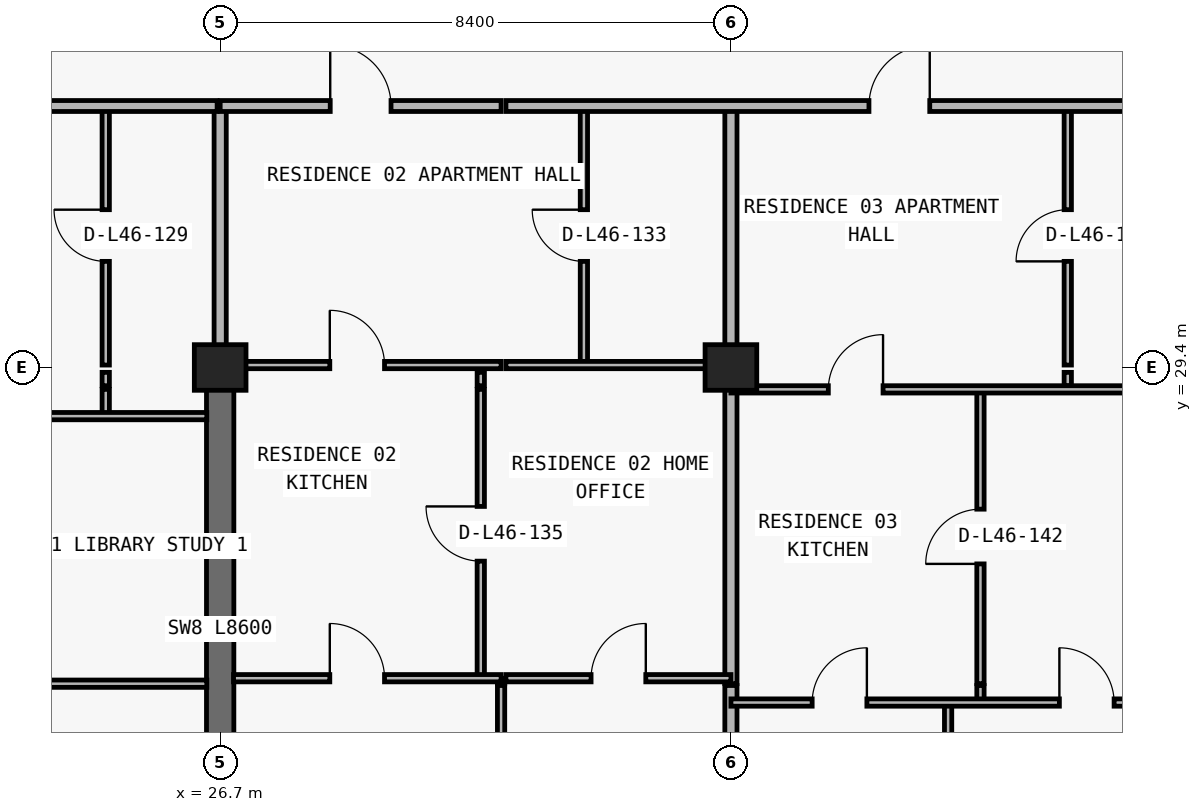
"""IFC4 building model, lengths in metres.
Left out: names, types, materials, properties, quantities, classifications, styles, units other than length and angle.
Written with IfcOpenShell. Run it as: python <this file> out.ifc"""

import sys

from ifc_helpers import new_model, si_unit, direction, frame, frame_2d, origin, origin_2d, place, context, subcontext, project, spatial, rectangle, extrude, element, fill, save


model = new_model("IFC4")
c1 = context("Model", 3, precision=1e-05, world=origin(), true_north=direction((0.0, 1.0)))
c2 = subcontext(c1, "Body", "Model", "MODEL_VIEW")
j1 = project(units=[si_unit("LENGTHUNIT", "METRE"), si_unit("PLANEANGLEUNIT", "RADIAN")], contexts=[c1])
p1 = place(None, origin())
s1 = spatial("IfcSite", under=j1, at=p1, CompositionType="ELEMENT")
p2 = place(p1, origin())
s2 = spatial("IfcBuilding", under=s1, at=p2, CompositionType="ELEMENT")
p3 = place(p2, frame((0.0, 0.0, 167.1)))
s3 = spatial("IfcBuildingStorey", under=s2, at=p3, CompositionType="ELEMENT", Elevation=167.1)
for number, where, z_axis, x_axis in (
    (1, (26.7, 29.4, 0.0), (0.0, 0.0, 1.0), (1.0, 0.0, 0.0)),
    (2, (35.1, 29.4, 0.0), (0.0, 0.0, 1.0), (1.0, 0.0, 0.0)),
):
    element("IfcColumn", number, at=place(p3, frame(where, z_axis=z_axis, x_axis=x_axis)), inside=s3, PredefinedType="COLUMN", context=c2, shape_type="SweptSolid", body=[
        extrude(rectangle(XDim=0.85, YDim=0.75, at=origin_2d()), origin(), (0.0, 0.0, 1.0), 3.05),
    ])
p4 = place(p3, frame((26.7, 20.8, 0.0), z_axis=(0.0, 0.0, 1.0), x_axis=(0.0, 1.0, 0.0)))
e3 = element("IfcWall", 3, at=p4, inside=s3, PredefinedType="SHEAR", context=c2, shape_type="SweptSolid", body=[
    extrude(rectangle(XDim=8.6, YDim=0.45, at=frame_2d((4.3, 0.0))), origin(), (0.0, 0.0, 1.0), 3.05),
])
p5 = place(p3, frame((24.818, 28.6, 0.0), z_axis=(0.0, 0.0, 1.0), x_axis=(0.0, 1.0, 0.0)))
e4 = element("IfcWall", 4, at=p5, inside=s3, PredefinedType="PARTITIONING", context=c2, shape_type="SweptSolid", body=[
    extrude(rectangle(XDim=0.44, YDim=0.12, at=frame_2d((0.22, 0.0))), origin(), (0.0, 0.0, 1.0), 3.05),
])
p6 = place(p3, frame((24.818, 29.1, 0.0), z_axis=(0.0, 0.0, 1.0), x_axis=(0.0, 1.0, 0.0)))
e5 = element("IfcWall", 5, at=p6, inside=s3, PredefinedType="PARTITIONING", context=c2, shape_type="SweptSolid", body=[
    extrude(rectangle(XDim=0.22, YDim=0.12, at=frame_2d((0.11, 0.0))), origin(), (0.0, 0.0, 1.0), 3.05),
])
p7 = place(p3, frame((24.818, 29.44, 0.0), z_axis=(0.0, 0.0, 1.0), x_axis=(0.0, 1.0, 0.0)))
e6 = element("IfcWall", 6, at=p7, inside=s3, PredefinedType="PARTITIONING", context=c2, shape_type="SweptSolid", body=[
    extrude(rectangle(XDim=4.26, YDim=0.12, at=frame_2d((2.13, 0.0))), origin(), (0.0, 0.0, 1.0), 3.05),
])
p8 = place(p7, frame((1.705, 0.0, 0.0)))
e7 = element("IfcOpeningElement", 7, at=p8, cuts=e6, PredefinedType="OPENING", context=c2, shape_type="SweptSolid", body=[
    extrude(rectangle(XDim=0.85, YDim=2.1, at=frame_2d((0.425, 1.05))), frame((0.0, 0.07, 0.0), z_axis=(0.0, -1.0, 0.0), x_axis=(1.0, 0.0, 0.0)), (0.0, 0.0, 1.0), 0.14),
])
p9 = place(p3, frame((26.7, 29.44, 0.0), z_axis=(0.0, 0.0, 1.0), x_axis=(0.0, 1.0, 0.0)))
e8 = element("IfcWall", 8, at=p9, inside=s3, PredefinedType="PARTITIONING", context=c2, shape_type="SweptSolid", body=[
    extrude(rectangle(XDim=4.26, YDim=0.2, at=frame_2d((2.13, 0.0))), origin(), (0.0, 0.0, 1.0), 2.335),
])
p10 = place(p3, frame((30.986, 24.29, 0.0), z_axis=(0.0, 0.0, 1.0), x_axis=(0.0, 1.0, 0.0)))
e9 = element("IfcWall", 9, at=p10, inside=s3, PredefinedType="PARTITIONING", context=c2, shape_type="SweptSolid", body=[
    extrude(rectangle(XDim=4.75, YDim=0.12, at=frame_2d((2.375, 0.0))), origin(), (0.0, 0.0, 1.0), 3.05),
])
p11 = place(p10, frame((1.925, 0.0, 0.0)))
e10 = element("IfcOpeningElement", 10, at=p11, cuts=e9, PredefinedType="OPENING", context=c2, shape_type="SweptSolid", body=[
    extrude(rectangle(XDim=0.9, YDim=2.15, at=frame_2d((0.45, 1.075))), frame((0.0, 0.07, 0.0), z_axis=(0.0, -1.0, 0.0), x_axis=(1.0, 0.0, 0.0)), (0.0, 0.0, 1.0), 0.14),
])
p12 = place(p3, frame((30.986, 29.1, 0.0), z_axis=(0.0, 0.0, 1.0), x_axis=(0.0, 1.0, 0.0)))
e11 = element("IfcWall", 11, at=p12, inside=s3, PredefinedType="PARTITIONING", context=c2, shape_type="SweptSolid", body=[
    extrude(rectangle(XDim=0.22, YDim=0.12, at=frame_2d((0.11, 0.0))), origin(), (0.0, 0.0, 1.0), 3.05),
])
p13 = place(p3, frame((31.32, 11.24, 0.0), z_axis=(0.0, 0.0, 1.0), x_axis=(0.0, 1.0, 0.0)))
e12 = element("IfcWall", 12, at=p13, inside=s3, PredefinedType="PARTITIONING", context=c2, shape_type="SweptSolid", body=[
    extrude(rectangle(XDim=12.93, YDim=0.12, at=frame_2d((6.465, 0.0))), origin(), (0.0, 0.0, 1.0), 3.05),
])
p14 = place(p3, frame((31.32, 24.2, 0.0), z_axis=(0.0, 0.0, 1.0), x_axis=(0.0, 1.0, 0.0)))
e13 = element("IfcWall", 13, at=p14, inside=s3, PredefinedType="PARTITIONING", context=c2, shape_type="SweptSolid", body=[
    extrude(rectangle(XDim=0.09, YDim=0.12, at=frame_2d((0.045, 0.0))), origin(), (0.0, 0.0, 1.0), 3.05),
])
p15 = place(p3, frame((32.682, 29.44, 0.0), z_axis=(0.0, 0.0, 1.0), x_axis=(0.0, 1.0, 0.0)))
e14 = element("IfcWall", 14, at=p15, inside=s3, PredefinedType="PARTITIONING", context=c2, shape_type="SweptSolid", body=[
    extrude(rectangle(XDim=4.26, YDim=0.12, at=frame_2d((2.13, 0.0))), origin(), (0.0, 0.0, 1.0), 3.05),
])
p16 = place(p15, frame((1.705, 0.0, 0.0)))
e15 = element("IfcOpeningElement", 15, at=p16, cuts=e14, PredefinedType="OPENING", context=c2, shape_type="SweptSolid", body=[
    extrude(rectangle(XDim=0.85, YDim=2.1, at=frame_2d((0.425, 1.05))), frame((0.0, 0.07, 0.0), z_axis=(0.0, -1.0, 0.0), x_axis=(1.0, 0.0, 0.0)), (0.0, 0.0, 1.0), 0.14),
])
p17 = place(p3, frame((35.1, 11.24, 0.0), z_axis=(0.0, 0.0, 1.0), x_axis=(0.0, 1.0, 0.0)))
e16 = element("IfcWall", 16, at=p17, inside=s3, PredefinedType="PARTITIONING", context=c2, shape_type="SweptSolid", body=[
    extrude(rectangle(XDim=12.93, YDim=0.2, at=frame_2d((6.465, 0.0))), origin(), (0.0, 0.0, 1.0), 2.263),
])
p18 = place(p3, frame((35.1, 24.2, 0.0), z_axis=(0.0, 0.0, 1.0), x_axis=(0.0, 1.0, 0.0)))
e17 = element("IfcWall", 17, at=p18, inside=s3, PredefinedType="PARTITIONING", context=c2, shape_type="SweptSolid", body=[
    extrude(rectangle(XDim=4.84, YDim=0.2, at=frame_2d((2.42, 0.0))), origin(), (0.0, 0.0, 1.0), 2.263),
])
p19 = place(p3, frame((35.1, 29.1, 0.0), z_axis=(0.0, 0.0, 1.0), x_axis=(0.0, 1.0, 0.0)))
e18 = element("IfcWall", 18, at=p19, inside=s3, PredefinedType="PARTITIONING", context=c2, shape_type="SweptSolid", body=[
    extrude(rectangle(XDim=0.22, YDim=0.2, at=frame_2d((0.11, 0.0))), origin(), (0.0, 0.0, 1.0), 3.05),
])
p20 = place(p3, frame((35.1, 29.44, 0.0), z_axis=(0.0, 0.0, 1.0), x_axis=(0.0, 1.0, 0.0)))
e19 = element("IfcWall", 19, at=p20, inside=s3, PredefinedType="PARTITIONING", context=c2, shape_type="SweptSolid", body=[
    extrude(rectangle(XDim=4.26, YDim=0.2, at=frame_2d((2.13, 0.0))), origin(), (0.0, 0.0, 1.0), 2.263),
])
p21 = place(p3, frame((38.672, 11.24, 0.0), z_axis=(0.0, 0.0, 1.0), x_axis=(0.0, 1.0, 0.0)))
e20 = element("IfcWall", 20, at=p21, inside=s3, PredefinedType="PARTITIONING", context=c2, shape_type="SweptSolid", body=[
    extrude(rectangle(XDim=12.65, YDim=0.12, at=frame_2d((6.325, 0.0))), origin(), (0.0, 0.0, 1.0), 3.05),
])
p22 = place(p3, frame((39.204, 23.89, 0.0), z_axis=(0.0, 0.0, 1.0), x_axis=(0.0, 1.0, 0.0)))
e21 = element("IfcWall", 21, at=p22, inside=s3, PredefinedType="PARTITIONING", context=c2, shape_type="SweptSolid", body=[
    extrude(rectangle(XDim=0.28, YDim=0.12, at=frame_2d((0.14, 0.0))), origin(), (0.0, 0.0, 1.0), 3.05),
])
p23 = place(p3, frame((39.204, 24.2, 0.0), z_axis=(0.0, 0.0, 1.0), x_axis=(0.0, 1.0, 0.0)))
e22 = element("IfcWall", 22, at=p23, inside=s3, PredefinedType="PARTITIONING", context=c2, shape_type="SweptSolid", body=[
    extrude(rectangle(XDim=4.84, YDim=0.12, at=frame_2d((2.42, 0.0))), origin(), (0.0, 0.0, 1.0), 3.05),
])
p24 = place(p23, frame((1.97, 0.0, 0.0)))
e23 = element("IfcOpeningElement", 23, at=p24, cuts=e22, PredefinedType="OPENING", context=c2, shape_type="SweptSolid", body=[
    extrude(rectangle(XDim=0.9, YDim=2.15, at=frame_2d((0.45, 1.075))), frame((0.0, 0.07, 0.0), z_axis=(0.0, -1.0, 0.0), x_axis=(1.0, 0.0, 0.0)), (0.0, 0.0, 1.0), 0.14),
])
p25 = place(p3, frame((40.64, 29.1, 0.0), z_axis=(0.0, 0.0, 1.0), x_axis=(0.0, 1.0, 0.0)))
e24 = element("IfcWall", 24, at=p25, inside=s3, PredefinedType="PARTITIONING", context=c2, shape_type="SweptSolid", body=[
    extrude(rectangle(XDim=0.22, YDim=0.12, at=frame_2d((0.11, 0.0))), origin(), (0.0, 0.0, 1.0), 2.725),
])
p26 = place(p3, frame((40.64, 29.44, 0.0), z_axis=(0.0, 0.0, 1.0), x_axis=(0.0, 1.0, 0.0)))
e25 = element("IfcWall", 25, at=p26, inside=s3, PredefinedType="PARTITIONING", context=c2, shape_type="SweptSolid", body=[
    extrude(rectangle(XDim=4.26, YDim=0.12, at=frame_2d((2.13, 0.0))), origin(), (0.0, 0.0, 1.0), 3.05),
])
p27 = place(p26, frame((1.705, 0.0, 0.0)))
e26 = element("IfcOpeningElement", 26, at=p27, cuts=e25, PredefinedType="OPENING", context=c2, shape_type="SweptSolid", body=[
    extrude(rectangle(XDim=0.85, YDim=2.1, at=frame_2d((0.425, 1.05))), frame((0.0, 0.07, 0.0), z_axis=(0.0, -1.0, 0.0), x_axis=(1.0, 0.0, 0.0)), (0.0, 0.0, 1.0), 0.14),
])
p28 = place(p3, frame((35.1, 23.89, 0.0), z_axis=(0.0, 0.0, 1.0), x_axis=(1.0, 0.0, 0.0)))
e27 = element("IfcWall", 27, at=p28, inside=s3, PredefinedType="PARTITIONING", context=c2, shape_type="SweptSolid", body=[
    extrude(rectangle(XDim=7.6, YDim=0.12, at=frame_2d((3.8, 0.0))), origin(), (0.0, 0.0, 1.0), 3.05),
])
p29 = place(p28, frame((1.336, 0.0, 0.0)))
e28 = element("IfcOpeningElement", 28, at=p29, cuts=e27, PredefinedType="OPENING", context=c2, shape_type="SweptSolid", body=[
    extrude(rectangle(XDim=0.9, YDim=2.15, at=frame_2d((0.45, 1.075))), frame((0.0, 0.07, 0.0), z_axis=(0.0, -1.0, 0.0), x_axis=(1.0, 0.0, 0.0)), (0.0, 0.0, 1.0), 0.14),
])
p30 = place(p28, frame((5.402, 0.0, 0.0)))
e29 = element("IfcOpeningElement", 29, at=p30, cuts=e27, PredefinedType="OPENING", context=c2, shape_type="SweptSolid", body=[
    extrude(rectangle(XDim=0.9, YDim=2.15, at=frame_2d((0.45, 1.075))), frame((0.0, 0.07, 0.0), z_axis=(0.0, -1.0, 0.0), x_axis=(1.0, 0.0, 0.0)), (0.0, 0.0, 1.0), 0.14),
])
p31 = place(p3, frame((18.3, 24.2, 0.0), z_axis=(0.0, 0.0, 1.0), x_axis=(1.0, 0.0, 0.0)))
e30 = element("IfcWall", 30, at=p31, inside=s3, PredefinedType="PARTITIONING", context=c2, shape_type="SweptSolid", body=[
    extrude(rectangle(XDim=8.18, YDim=0.12, at=frame_2d((4.09, 0.0))), origin(), (0.0, 0.0, 1.0), 3.05),
])
p32 = place(p31, frame((3.64, 0.0, 0.0)))
e31 = element("IfcOpeningElement", 31, at=p32, cuts=e30, PredefinedType="OPENING", context=c2, shape_type="SweptSolid", body=[
    extrude(rectangle(XDim=0.9, YDim=2.15, at=frame_2d((0.45, 1.075))), frame((0.0, 0.07, 0.0), z_axis=(0.0, -1.0, 0.0), x_axis=(1.0, 0.0, 0.0)), (0.0, 0.0, 1.0), 0.14),
])
p33 = place(p3, frame((26.92, 24.29, 0.0), z_axis=(0.0, 0.0, 1.0), x_axis=(1.0, 0.0, 0.0)))
e32 = element("IfcWall", 32, at=p33, inside=s3, PredefinedType="PARTITIONING", context=c2, shape_type="SweptSolid", body=[
    extrude(rectangle(XDim=4.4, YDim=0.12, at=frame_2d((2.2, 0.0))), origin(), (0.0, 0.0, 1.0), 3.05),
])
p34 = place(p33, frame((1.583, 0.0, 0.0)))
e33 = element("IfcOpeningElement", 33, at=p34, cuts=e32, PredefinedType="OPENING", context=c2, shape_type="SweptSolid", body=[
    extrude(rectangle(XDim=0.9, YDim=2.15, at=frame_2d((0.45, 1.075))), frame((0.0, 0.07, 0.0), z_axis=(0.0, -1.0, 0.0), x_axis=(1.0, 0.0, 0.0)), (0.0, 0.0, 1.0), 0.14),
])
p35 = place(p3, frame((31.4, 24.29, 0.0), z_axis=(0.0, 0.0, 1.0), x_axis=(1.0, 0.0, 0.0)))
e34 = element("IfcWall", 34, at=p35, inside=s3, PredefinedType="PARTITIONING", context=c2, shape_type="SweptSolid", body=[
    extrude(rectangle(XDim=3.7, YDim=0.12, at=frame_2d((1.85, 0.0))), origin(), (0.0, 0.0, 1.0), 3.05),
])
p36 = place(p35, frame((1.4, 0.0, 0.0)))
e35 = element("IfcOpeningElement", 35, at=p36, cuts=e34, PredefinedType="OPENING", context=c2, shape_type="SweptSolid", body=[
    extrude(rectangle(XDim=0.9, YDim=2.15, at=frame_2d((0.45, 1.075))), frame((0.0, 0.07, 0.0), z_axis=(0.0, -1.0, 0.0), x_axis=(1.0, 0.0, 0.0)), (0.0, 0.0, 1.0), 0.14),
])
p37 = place(p3, frame((18.3, 28.6, 0.0), z_axis=(0.0, 0.0, 1.0), x_axis=(1.0, 0.0, 0.0)))
e36 = element("IfcWall", 36, at=p37, inside=s3, PredefinedType="PARTITIONING", context=c2, shape_type="SweptSolid", body=[
    extrude(rectangle(XDim=8.18, YDim=0.12, at=frame_2d((4.09, 0.0))), origin(), (0.0, 0.0, 1.0), 3.05),
])
p38 = place(p37, frame((2.809, 0.0, 0.0)))
e37 = element("IfcOpeningElement", 37, at=p38, cuts=e36, PredefinedType="OPENING", context=c2, shape_type="SweptSolid", body=[
    extrude(rectangle(XDim=0.9, YDim=2.15, at=frame_2d((0.45, 1.075))), frame((0.0, 0.07, 0.0), z_axis=(0.0, -1.0, 0.0), x_axis=(1.0, 0.0, 0.0)), (0.0, 0.0, 1.0), 0.14),
])
p39 = place(p3, frame((35.1, 29.04, 0.0), z_axis=(0.0, 0.0, 1.0), x_axis=(1.0, 0.0, 0.0)))
e38 = element("IfcWall", 38, at=p39, inside=s3, PredefinedType="PARTITIONING", context=c2, shape_type="SweptSolid", body=[
    extrude(rectangle(XDim=7.6, YDim=0.12, at=frame_2d((3.8, 0.0))), origin(), (0.0, 0.0, 1.0), 3.05),
])
p40 = place(p39, frame((1.602, 0.0, 0.0)))
e39 = element("IfcOpeningElement", 39, at=p40, cuts=e38, PredefinedType="OPENING", context=c2, shape_type="SweptSolid", body=[
    extrude(rectangle(XDim=0.9, YDim=2.15, at=frame_2d((0.45, 1.075))), frame((0.0, 0.07, 0.0), z_axis=(0.0, -1.0, 0.0), x_axis=(1.0, 0.0, 0.0)), (0.0, 0.0, 1.0), 0.14),
])
p41 = place(p3, frame((26.92, 29.44, 0.0), z_axis=(0.0, 0.0, 1.0), x_axis=(1.0, 0.0, 0.0)))
e40 = element("IfcWall", 40, at=p41, inside=s3, PredefinedType="PARTITIONING", context=c2, shape_type="SweptSolid", body=[
    extrude(rectangle(XDim=4.4, YDim=0.12, at=frame_2d((2.2, 0.0))), origin(), (0.0, 0.0, 1.0), 2.263),
])
p42 = place(p41, frame((1.583, 0.0, 0.0)))
e41 = element("IfcOpeningElement", 41, at=p42, cuts=e40, PredefinedType="OPENING", context=c2, shape_type="SweptSolid", body=[
    extrude(rectangle(XDim=0.9, YDim=2.15, at=frame_2d((0.45, 1.075))), frame((0.0, 0.07, 0.0), z_axis=(0.0, -1.0, 0.0), x_axis=(1.0, 0.0, 0.0)), (0.0, 0.0, 1.0), 0.14),
])
p43 = place(p3, frame((31.4, 29.44, 0.0), z_axis=(0.0, 0.0, 1.0), x_axis=(1.0, 0.0, 0.0)))
e42 = element("IfcWall", 42, at=p43, inside=s3, PredefinedType="PARTITIONING", context=c2, shape_type="SweptSolid", body=[
    extrude(rectangle(XDim=3.7, YDim=0.12, at=frame_2d((1.85, 0.0))), origin(), (0.0, 0.0, 1.0), 2.263),
])
p44 = place(p3, frame((18.3, 33.7, 0.0), z_axis=(0.0, 0.0, 1.0), x_axis=(1.0, 0.0, 0.0)))
e43 = element("IfcWall", 43, at=p44, inside=s3, PredefinedType="PARTITIONING", context=c2, shape_type="SweptSolid", body=[
    extrude(rectangle(XDim=8.35, YDim=0.18, at=frame_2d((4.175, 0.0))), origin(), (0.0, 0.0, 1.0), 3.05),
])
p45 = place(p3, frame((26.7, 33.7, 0.0), z_axis=(0.0, 0.0, 1.0), x_axis=(1.0, 0.0, 0.0)))
e44 = element("IfcWall", 44, at=p45, inside=s3, PredefinedType="PARTITIONING", context=c2, shape_type="SweptSolid", body=[
    extrude(rectangle(XDim=4.62, YDim=0.18, at=frame_2d((2.31, 0.0))), origin(), (0.0, 0.0, 1.0), 3.05),
])
p46 = place(p45, frame((1.81, 0.0, 0.0)))
e45 = element("IfcOpeningElement", 45, at=p46, cuts=e44, PredefinedType="OPENING", context=c2, shape_type="SweptSolid", body=[
    extrude(rectangle(XDim=1.0, YDim=2.2, at=frame_2d((0.5, 1.1))), frame((0.0, 0.1, 0.0), z_axis=(0.0, -1.0, 0.0), x_axis=(1.0, 0.0, 0.0)), (0.0, 0.0, 1.0), 0.2),
])
p47 = place(p3, frame((31.4, 33.7, 0.0), z_axis=(0.0, 0.0, 1.0), x_axis=(1.0, 0.0, 0.0)))
e46 = element("IfcWall", 46, at=p47, inside=s3, PredefinedType="PARTITIONING", context=c2, shape_type="SweptSolid", body=[
    extrude(rectangle(XDim=28.1, YDim=0.18, at=frame_2d((14.05, 0.0))), origin(), (0.0, 0.0, 1.0), 3.05),
])
p48 = place(p47, frame((5.97, 0.0, 0.0)))
e47 = element("IfcOpeningElement", 47, at=p48, cuts=e46, PredefinedType="OPENING", context=c2, shape_type="SweptSolid", body=[
    extrude(rectangle(XDim=1.0, YDim=2.2, at=frame_2d((0.5, 1.1))), frame((0.0, 0.1, 0.0), z_axis=(0.0, -1.0, 0.0), x_axis=(1.0, 0.0, 0.0)), (0.0, 0.0, 1.0), 0.2),
])
p49 = place(p47, frame((13.824, 0.0, 0.0)))
e48 = element("IfcOpeningElement", 48, at=p49, cuts=e46, PredefinedType="OPENING", context=c2, shape_type="SweptSolid", body=[
    extrude(rectangle(XDim=1.0, YDim=2.2, at=frame_2d((0.5, 1.1))), frame((0.0, 0.1, 0.0), z_axis=(0.0, -1.0, 0.0), x_axis=(1.0, 0.0, 0.0)), (0.0, 0.0, 1.0), 0.2),
])
p50 = place(p47, frame((22.349, 0.0, 0.0)))
e49 = element("IfcOpeningElement", 49, at=p50, cuts=e46, PredefinedType="OPENING", context=c2, shape_type="SweptSolid", body=[
    extrude(rectangle(XDim=1.0, YDim=2.2, at=frame_2d((0.5, 1.1))), frame((0.0, 0.1, 0.0), z_axis=(0.0, -1.0, 0.0), x_axis=(1.0, 0.0, 0.0)), (0.0, 0.0, 1.0), 0.2),
])
p51 = place(p8, origin())
e50 = element("IfcDoor", 50, at=p51, inside=s3, OperationType="SINGLE_SWING_RIGHT", PredefinedType="DOOR", context=c2, shape_type="SweptSolid", body=[
    extrude(rectangle(XDim=0.85, YDim=2.1, at=frame_2d((0.425, 1.05))), frame((0.0, 0.025, 0.0), z_axis=(0.0, -1.0, 0.0), x_axis=(1.0, 0.0, 0.0)), (0.0, 0.0, 1.0), 0.05),
])
fill(e7, e50)
p52 = place(p46, origin())
e51 = element("IfcDoor", 51, at=p52, inside=s3, OperationType="SINGLE_SWING_LEFT", PredefinedType="DOOR", context=c2, shape_type="SweptSolid", body=[
    extrude(rectangle(XDim=1.0, YDim=2.2, at=frame_2d((0.5, 1.1))), frame((0.0, 0.025, 0.0), z_axis=(0.0, -1.0, 0.0), x_axis=(1.0, 0.0, 0.0)), (0.0, 0.0, 1.0), 0.05),
])
fill(e45, e51)
p53 = place(p16, origin())
e52 = element("IfcDoor", 52, at=p53, inside=s3, OperationType="SINGLE_SWING_RIGHT", PredefinedType="DOOR", context=c2, shape_type="SweptSolid", body=[
    extrude(rectangle(XDim=0.85, YDim=2.1, at=frame_2d((0.425, 1.05))), frame((0.0, 0.025, 0.0), z_axis=(0.0, -1.0, 0.0), x_axis=(1.0, 0.0, 0.0)), (0.0, 0.0, 1.0), 0.05),
])
fill(e15, e52)
p54 = place(p42, origin())
e53 = element("IfcDoor", 53, at=p54, inside=s3, OperationType="SINGLE_SWING_LEFT", PredefinedType="DOOR", context=c2, shape_type="SweptSolid", body=[
    extrude(rectangle(XDim=0.9, YDim=2.15, at=frame_2d((0.45, 1.075))), frame((0.0, 0.025, 0.0), z_axis=(0.0, -1.0, 0.0), x_axis=(1.0, 0.0, 0.0)), (0.0, 0.0, 1.0), 0.05),
])
fill(e41, e53)
p55 = place(p11, origin())
e54 = element("IfcDoor", 54, at=p55, inside=s3, OperationType="SINGLE_SWING_RIGHT", PredefinedType="DOOR", context=c2, shape_type="SweptSolid", body=[
    extrude(rectangle(XDim=0.9, YDim=2.15, at=frame_2d((0.45, 1.075))), frame((0.0, 0.025, 0.0), z_axis=(0.0, -1.0, 0.0), x_axis=(1.0, 0.0, 0.0)), (0.0, 0.0, 1.0), 0.05),
])
fill(e10, e54)
p56 = place(p34, origin())
e55 = element("IfcDoor", 55, at=p56, inside=s3, OperationType="SINGLE_SWING_LEFT", PredefinedType="DOOR", context=c2, shape_type="SweptSolid", body=[
    extrude(rectangle(XDim=0.9, YDim=2.15, at=frame_2d((0.45, 1.075))), frame((0.0, 0.025, 0.0), z_axis=(0.0, -1.0, 0.0), x_axis=(1.0, 0.0, 0.0)), (0.0, 0.0, 1.0), 0.05),
])
fill(e33, e55)
p57 = place(p36, origin())
e56 = element("IfcDoor", 56, at=p57, inside=s3, OperationType="SINGLE_SWING_RIGHT", PredefinedType="DOOR", context=c2, shape_type="SweptSolid", body=[
    extrude(rectangle(XDim=0.9, YDim=2.15, at=frame_2d((0.45, 1.075))), frame((0.0, 0.025, 0.0), z_axis=(0.0, -1.0, 0.0), x_axis=(1.0, 0.0, 0.0)), (0.0, 0.0, 1.0), 0.05),
])
fill(e35, e56)
p58 = place(p48, origin())
e57 = element("IfcDoor", 57, at=p58, inside=s3, OperationType="SINGLE_SWING_RIGHT", PredefinedType="DOOR", context=c2, shape_type="SweptSolid", body=[
    extrude(rectangle(XDim=1.0, YDim=2.2, at=frame_2d((0.5, 1.1))), frame((0.0, 0.025, 0.0), z_axis=(0.0, -1.0, 0.0), x_axis=(1.0, 0.0, 0.0)), (0.0, 0.0, 1.0), 0.05),
])
fill(e47, e57)
p59 = place(p27, origin())
e58 = element("IfcDoor", 58, at=p59, inside=s3, OperationType="SINGLE_SWING_LEFT", PredefinedType="DOOR", context=c2, shape_type="SweptSolid", body=[
    extrude(rectangle(XDim=0.85, YDim=2.1, at=frame_2d((0.425, 1.05))), frame((0.0, 0.025, 0.0), z_axis=(0.0, -1.0, 0.0), x_axis=(1.0, 0.0, 0.0)), (0.0, 0.0, 1.0), 0.05),
])
fill(e26, e58)
p60 = place(p40, origin())
e59 = element("IfcDoor", 59, at=p60, inside=s3, OperationType="SINGLE_SWING_RIGHT", PredefinedType="DOOR", context=c2, shape_type="SweptSolid", body=[
    extrude(rectangle(XDim=0.9, YDim=2.15, at=frame_2d((0.45, 1.075))), frame((0.0, 0.025, 0.0), z_axis=(0.0, -1.0, 0.0), x_axis=(1.0, 0.0, 0.0)), (0.0, 0.0, 1.0), 0.05),
])
fill(e39, e59)
p61 = place(p24, origin())
e60 = element("IfcDoor", 60, at=p61, inside=s3, OperationType="SINGLE_SWING_LEFT", PredefinedType="DOOR", context=c2, shape_type="SweptSolid", body=[
    extrude(rectangle(XDim=0.9, YDim=2.15, at=frame_2d((0.45, 1.075))), frame((0.0, 0.025, 0.0), z_axis=(0.0, -1.0, 0.0), x_axis=(1.0, 0.0, 0.0)), (0.0, 0.0, 1.0), 0.05),
])
fill(e23, e60)
p62 = place(p29, origin())
e61 = element("IfcDoor", 61, at=p62, inside=s3, OperationType="SINGLE_SWING_RIGHT", PredefinedType="DOOR", context=c2, shape_type="SweptSolid", body=[
    extrude(rectangle(XDim=0.9, YDim=2.15, at=frame_2d((0.45, 1.075))), frame((0.0, 0.025, 0.0), z_axis=(0.0, -1.0, 0.0), x_axis=(1.0, 0.0, 0.0)), (0.0, 0.0, 1.0), 0.05),
])
fill(e28, e61)
p63 = place(p30, origin())
e62 = element("IfcDoor", 62, at=p63, inside=s3, OperationType="SINGLE_SWING_LEFT", PredefinedType="DOOR", context=c2, shape_type="SweptSolid", body=[
    extrude(rectangle(XDim=0.9, YDim=2.15, at=frame_2d((0.45, 1.075))), frame((0.0, 0.025, 0.0), z_axis=(0.0, -1.0, 0.0), x_axis=(1.0, 0.0, 0.0)), (0.0, 0.0, 1.0), 0.05),
])
fill(e29, e62)
save(model, sys.argv[1])
